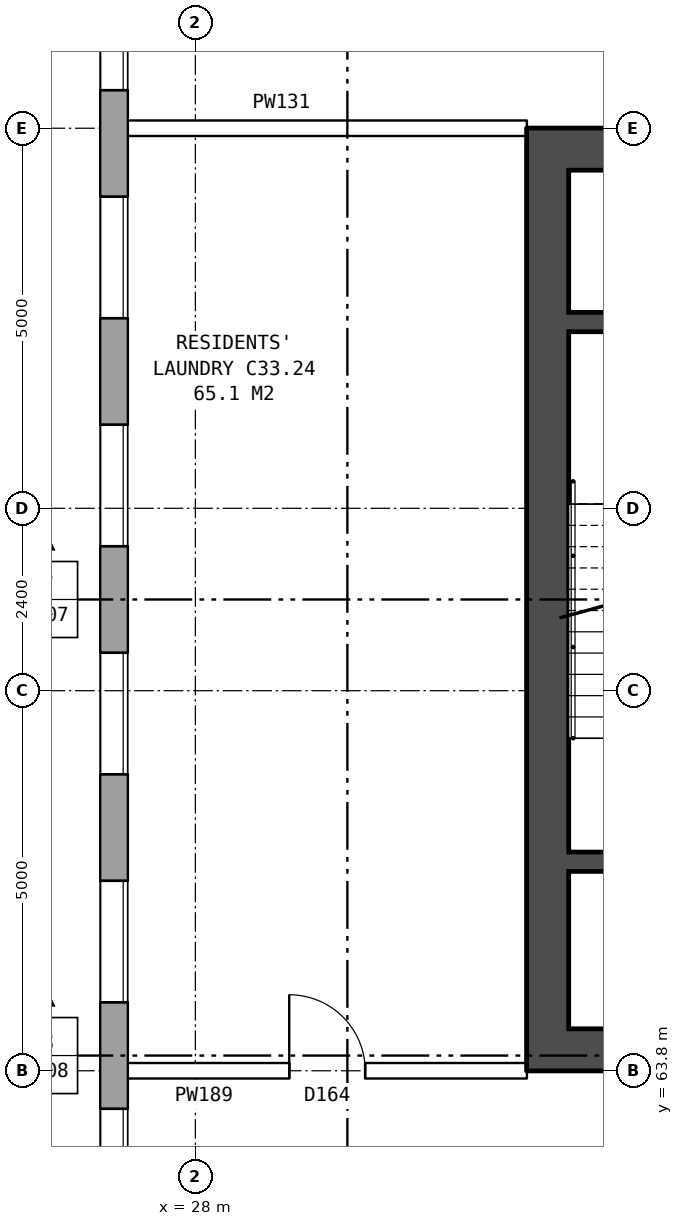
"""IFC4 building model, lengths in metres.
Left out: names, types, materials, properties, quantities, classifications, styles, units other than length and angle.
Written with IfcOpenShell. Run it as: python <this file> out.ifc"""

import sys

from ifc_helpers import new_model, si_unit, direction, frame, frame_2d, origin, place, context, subcontext, project, spatial, rectangle, extrude, element, fill, save


model = new_model("IFC4")
c1 = context("Model", 3, precision=1e-05, world=origin(), true_north=direction((0.0, 1.0)))
c2 = subcontext(c1, "Body", "Model", "MODEL_VIEW")
j1 = project(units=[si_unit("LENGTHUNIT", "METRE"), si_unit("PLANEANGLEUNIT", "RADIAN")], contexts=[c1])
p1 = place(None, origin())
s1 = spatial("IfcSite", under=j1, at=p1, CompositionType="ELEMENT")
p2 = place(p1, origin())
s2 = spatial("IfcBuilding", under=s1, at=p2, CompositionType="ELEMENT")
p3 = place(p2, frame((0.0, 0.0, 119.5)))
s3 = spatial("IfcBuildingStorey", under=s2, at=p3, CompositionType="ELEMENT", Elevation=119.5)
p4 = place(p3, frame((26.93, 82.925, 0.0), z_axis=(0.0, 0.0, 1.0), x_axis=(0.0, -1.0, 0.0)))
e1 = element("IfcWall", 1, at=p4, inside=s3, PredefinedType="STANDARD", context=c2, shape_type="SweptSolid", body=[
    extrude(rectangle(XDim=25.851, YDim=0.36, at=frame_2d((12.925, 0.0))), origin(), (0.0, 0.0, 1.0), 3.6),
])
p5 = place(p4, frame((1.625, 0.0, 0.8)))
e2 = element("IfcOpeningElement", 2, at=p5, cuts=e1, PredefinedType="OPENING", context=c2, shape_type="SweptSolid", body=[
    extrude(rectangle(XDim=1.6, YDim=1.8, at=frame_2d((0.8, 0.9))), frame((0.0, 0.19, 0.0), z_axis=(0.0, -1.0, 0.0), x_axis=(1.0, 0.0, 0.0)), (0.0, 0.0, 1.0), 0.38),
])
p6 = place(p4, frame((4.625, 0.0, 0.8)))
e3 = element("IfcOpeningElement", 3, at=p6, cuts=e1, PredefinedType="OPENING", context=c2, shape_type="SweptSolid", body=[
    extrude(rectangle(XDim=1.6, YDim=1.8, at=frame_2d((0.8, 0.9))), frame((0.0, 0.19, 0.0), z_axis=(0.0, -1.0, 0.0), x_axis=(1.0, 0.0, 0.0)), (0.0, 0.0, 1.0), 0.38),
])
p7 = place(p4, frame((7.625, 0.0, 0.8)))
e4 = element("IfcOpeningElement", 4, at=p7, cuts=e1, PredefinedType="OPENING", context=c2, shape_type="SweptSolid", body=[
    extrude(rectangle(XDim=1.6, YDim=1.8, at=frame_2d((0.8, 0.9))), frame((0.0, 0.19, 0.0), z_axis=(0.0, -1.0, 0.0), x_axis=(1.0, 0.0, 0.0)), (0.0, 0.0, 1.0), 0.38),
])
p8 = place(p4, frame((10.625, 0.0, 0.8)))
e5 = element("IfcOpeningElement", 5, at=p8, cuts=e1, PredefinedType="OPENING", context=c2, shape_type="SweptSolid", body=[
    extrude(rectangle(XDim=1.6, YDim=1.8, at=frame_2d((0.8, 0.9))), frame((0.0, 0.19, 0.0), z_axis=(0.0, -1.0, 0.0), x_axis=(1.0, 0.0, 0.0)), (0.0, 0.0, 1.0), 0.38),
])
p9 = place(p4, frame((13.625, 0.0, 0.8)))
e6 = element("IfcOpeningElement", 6, at=p9, cuts=e1, PredefinedType="OPENING", context=c2, shape_type="SweptSolid", body=[
    extrude(rectangle(XDim=1.6, YDim=1.8, at=frame_2d((0.8, 0.9))), frame((0.0, 0.19, 0.0), z_axis=(0.0, -1.0, 0.0), x_axis=(1.0, 0.0, 0.0)), (0.0, 0.0, 1.0), 0.38),
])
p10 = place(p4, frame((16.625, 0.0, 0.8)))
e7 = element("IfcOpeningElement", 7, at=p10, cuts=e1, PredefinedType="OPENING", context=c2, shape_type="SweptSolid", body=[
    extrude(rectangle(XDim=1.6, YDim=1.8, at=frame_2d((0.8, 0.9))), frame((0.0, 0.19, 0.0), z_axis=(0.0, -1.0, 0.0), x_axis=(1.0, 0.0, 0.0)), (0.0, 0.0, 1.0), 0.38),
])
p11 = place(p4, frame((19.625, 0.0, 0.8)))
e8 = element("IfcOpeningElement", 8, at=p11, cuts=e1, PredefinedType="OPENING", context=c2, shape_type="SweptSolid", body=[
    extrude(rectangle(XDim=1.6, YDim=1.8, at=frame_2d((0.8, 0.9))), frame((0.0, 0.19, 0.0), z_axis=(0.0, -1.0, 0.0), x_axis=(1.0, 0.0, 0.0)), (0.0, 0.0, 1.0), 0.38),
])
p12 = place(p4, frame((22.625, 0.0, 0.8)))
e9 = element("IfcOpeningElement", 9, at=p12, cuts=e1, PredefinedType="OPENING", context=c2, shape_type="SweptSolid", body=[
    extrude(rectangle(XDim=1.6, YDim=1.8, at=frame_2d((0.8, 0.9))), frame((0.0, 0.19, 0.0), z_axis=(0.0, -1.0, 0.0), x_axis=(1.0, 0.0, 0.0)), (0.0, 0.0, 1.0), 0.38),
])
p13 = place(p3, frame((32.635, 76.2, 0.0), z_axis=(0.0, 0.0, 1.0), x_axis=(0.0, -1.0, 0.0)))
e10 = element("IfcWall", 10, at=p13, inside=s3, PredefinedType="SHEAR", context=c2, shape_type="SweptSolid", body=[
    extrude(rectangle(XDim=12.4, YDim=0.55, at=frame_2d((6.2, 0.0))), origin(), (0.0, 0.0, 1.0), 3.6),
])
for number, where, z_axis, x_axis in (
    (11, (40.81, 75.925, 0.0), (0.0, 0.0, 1.0), (-1.0, 0.0, 0.0)),
    (12, (40.81, 64.075, 0.0), (0.0, 0.0, 1.0), (-1.0, 0.0, 0.0)),
):
    element("IfcWall", number, at=place(p3, frame(where, z_axis=z_axis, x_axis=x_axis)), inside=s3, PredefinedType="SHEAR", context=c2, shape_type="SweptSolid", body=[
        extrude(rectangle(XDim=7.9, YDim=0.55, at=frame_2d((3.95, 0.0))), origin(), (0.0, 0.0, 1.0), 3.6),
    ])
p14 = place(p3, frame((35.985, 73.65, 0.0), z_axis=(0.0, 0.0, 1.0), x_axis=(-1.0, 0.0, 0.0)))
e13 = element("IfcWall", 13, at=p14, inside=s3, PredefinedType="SHEAR", context=c2, shape_type="SweptSolid", body=[
    extrude(rectangle(XDim=3.075, YDim=0.25, at=frame_2d((1.538, 0.0))), origin(), (0.0, 0.0, 1.0), 3.6),
])
p15 = place(p3, frame((35.985, 66.55, 0.0), z_axis=(0.0, 0.0, 1.0), x_axis=(-1.0, 0.0, 0.0)))
e14 = element("IfcWall", 14, at=p15, inside=s3, PredefinedType="SHEAR", context=c2, shape_type="SweptSolid", body=[
    extrude(rectangle(XDim=3.075, YDim=0.25, at=frame_2d((1.538, 0.0))), origin(), (0.0, 0.0, 1.0), 3.6),
])
p16 = place(p15, frame((0.15, 0.0, 0.0)))
e15 = element("IfcOpeningElement", 15, at=p16, cuts=e14, PredefinedType="OPENING", context=c2, shape_type="SweptSolid", body=[
    extrude(rectangle(XDim=1.1, YDim=2.1, at=frame_2d((0.55, 1.05))), frame((0.0, 0.135, 0.0), z_axis=(0.0, -1.0, 0.0), x_axis=(1.0, 0.0, 0.0)), (0.0, 0.0, 1.0), 0.27),
])
p17 = place(p3, frame((26.99, 63.8, 0.0), z_axis=(0.0, 0.0, 1.0), x_axis=(1.0, 0.0, 0.0)))
e16 = element("IfcWall", 16, at=p17, inside=s3, PredefinedType="PARTITIONING", context=c2, shape_type="SweptSolid", body=[
    extrude(rectangle(XDim=5.37, YDim=0.2, at=frame_2d((2.685, 0.0))), origin(), (0.0, 0.0, 1.0), 3.6),
])
p18 = place(p17, frame((2.245, 0.0, 0.0)))
e17 = element("IfcOpeningElement", 17, at=p18, cuts=e16, PredefinedType="OPENING", context=c2, shape_type="SweptSolid", body=[
    extrude(rectangle(XDim=1.0, YDim=2.1, at=frame_2d((0.5, 1.05))), frame((0.0, 0.11, 0.0), z_axis=(0.0, -1.0, 0.0), x_axis=(1.0, 0.0, 0.0)), (0.0, 0.0, 1.0), 0.22),
])
p19 = place(p3, frame((26.99, 76.2, 0.0), z_axis=(0.0, 0.0, 1.0), x_axis=(1.0, 0.0, 0.0)))
e18 = element("IfcWall", 18, at=p19, inside=s3, PredefinedType="PARTITIONING", context=c2, shape_type="SweptSolid", body=[
    extrude(rectangle(XDim=5.37, YDim=0.2, at=frame_2d((2.685, 0.0))), origin(), (0.0, 0.0, 1.0), 3.6),
])
p20 = place(p6, origin())
e19 = element("IfcWindow", 19, at=p20, inside=s3, PartitioningType="SINGLE_PANEL", PredefinedType="WINDOW", context=c2, shape_type="SweptSolid", body=[
    extrude(rectangle(XDim=1.6, YDim=1.8, at=frame_2d((0.8, 0.9))), frame((0.0, 0.15, 0.0), z_axis=(0.0, -1.0, 0.0), x_axis=(1.0, 0.0, 0.0)), (0.0, 0.0, 1.0), 0.06),
])
fill(e3, e19)
p21 = place(p7, origin())
e20 = element("IfcWindow", 20, at=p21, inside=s3, PartitioningType="SINGLE_PANEL", PredefinedType="WINDOW", context=c2, shape_type="SweptSolid", body=[
    extrude(rectangle(XDim=1.6, YDim=1.8, at=frame_2d((0.8, 0.9))), frame((0.0, 0.15, 0.0), z_axis=(0.0, -1.0, 0.0), x_axis=(1.0, 0.0, 0.0)), (0.0, 0.0, 1.0), 0.06),
])
fill(e4, e20)
p22 = place(p8, origin())
e21 = element("IfcWindow", 21, at=p22, inside=s3, PartitioningType="SINGLE_PANEL", PredefinedType="WINDOW", context=c2, shape_type="SweptSolid", body=[
    extrude(rectangle(XDim=1.6, YDim=1.8, at=frame_2d((0.8, 0.9))), frame((0.0, 0.15, 0.0), z_axis=(0.0, -1.0, 0.0), x_axis=(1.0, 0.0, 0.0)), (0.0, 0.0, 1.0), 0.06),
])
fill(e5, e21)
p23 = place(p9, origin())
e22 = element("IfcWindow", 22, at=p23, inside=s3, PartitioningType="SINGLE_PANEL", PredefinedType="WINDOW", context=c2, shape_type="SweptSolid", body=[
    extrude(rectangle(XDim=1.6, YDim=1.8, at=frame_2d((0.8, 0.9))), frame((0.0, 0.15, 0.0), z_axis=(0.0, -1.0, 0.0), x_axis=(1.0, 0.0, 0.0)), (0.0, 0.0, 1.0), 0.06),
])
fill(e6, e22)
p24 = place(p10, origin())
e23 = element("IfcWindow", 23, at=p24, inside=s3, PartitioningType="SINGLE_PANEL", PredefinedType="WINDOW", context=c2, shape_type="SweptSolid", body=[
    extrude(rectangle(XDim=1.6, YDim=1.8, at=frame_2d((0.8, 0.9))), frame((0.0, 0.15, 0.0), z_axis=(0.0, -1.0, 0.0), x_axis=(1.0, 0.0, 0.0)), (0.0, 0.0, 1.0), 0.06),
])
fill(e7, e23)
p25 = place(p11, origin())
e24 = element("IfcWindow", 24, at=p25, inside=s3, PartitioningType="SINGLE_PANEL", PredefinedType="WINDOW", context=c2, shape_type="SweptSolid", body=[
    extrude(rectangle(XDim=1.6, YDim=1.8, at=frame_2d((0.8, 0.9))), frame((0.0, 0.15, 0.0), z_axis=(0.0, -1.0, 0.0), x_axis=(1.0, 0.0, 0.0)), (0.0, 0.0, 1.0), 0.06),
])
fill(e8, e24)
p26 = place(p18, origin())
e25 = element("IfcDoor", 25, at=p26, inside=s3, OperationType="SINGLE_SWING_LEFT", PredefinedType="DOOR", context=c2, shape_type="SweptSolid", body=[
    extrude(rectangle(XDim=1.0, YDim=2.1, at=frame_2d((0.5, 1.05))), frame((0.0, 0.025, 0.0), z_axis=(0.0, -1.0, 0.0), x_axis=(1.0, 0.0, 0.0)), (0.0, 0.0, 1.0), 0.05),
])
fill(e17, e25)
save(model, sys.argv[1])
